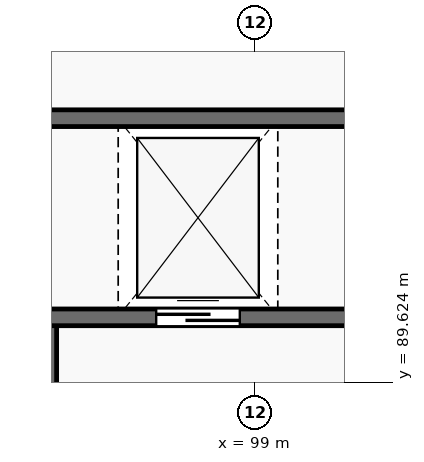
"""IFC4 building model, lengths in metres.
Left out: names, types, materials, properties, quantities, classifications, styles, units other than length and angle.
Written with IfcOpenShell. Run it as: python <this file> out.ifc"""

import sys

from ifc_helpers import new_model, si_unit, direction, frame, frame_2d, origin, place, context, subcontext, project, spatial, rectangle, extrude, element, fill, save


model = new_model("IFC4")
c1 = context("Model", 3, precision=1e-05, world=origin(), true_north=direction((0.0, 1.0)))
c2 = subcontext(c1, "Body", "Model", "MODEL_VIEW")
j1 = project(units=[si_unit("LENGTHUNIT", "METRE"), si_unit("PLANEANGLEUNIT", "RADIAN")], contexts=[c1])
p1 = place(None, origin())
s1 = spatial("IfcSite", under=j1, at=p1, CompositionType="ELEMENT")
p2 = place(p1, origin())
s2 = spatial("IfcBuilding", under=s1, at=p2, CompositionType="ELEMENT")
p3 = place(p2, frame((0.0, 0.0, 6.0)))
s3 = spatial("IfcBuildingStorey", under=s2, at=p3, CompositionType="ELEMENT", Elevation=6.0)
p4 = place(p3, frame((96.27, 86.4, 0.0), z_axis=(0.0, 0.0, 1.0), x_axis=(0.0, 1.0, 0.0)))
e1 = element("IfcWall", 1, at=p4, inside=s3, PredefinedType="SHEAR", context=c2, shape_type="SweptSolid", body=[
    extrude(rectangle(XDim=4.0, YDim=0.24, at=frame_2d((2.0, 0.0))), origin(), (0.0, 0.0, 1.0), 4.8),
])
p5 = place(p4, frame((1.3, 0.0, 0.0)))
e2 = element("IfcOpeningElement", 2, at=p5, cuts=e1, PredefinedType="OPENING", context=c2, shape_type="SweptSolid", body=[
    extrude(rectangle(XDim=1.4, YDim=2.2, at=frame_2d((0.7, 1.1))), frame((0.0, 0.135, 0.0), z_axis=(0.0, -1.0, 0.0), x_axis=(1.0, 0.0, 0.0)), (0.0, 0.0, 1.0), 0.27),
])
p6 = place(p3, frame((96.17, 90.48, 0.0), z_axis=(0.0, 0.0, 1.0), x_axis=(1.0, 0.0, 0.0)))
e3 = element("IfcWall", 3, at=p6, inside=s3, PredefinedType="SHEAR", context=c2, shape_type="SweptSolid", body=[
    extrude(rectangle(XDim=4.16, YDim=0.22, at=frame_2d((2.08, 0.0))), origin(), (0.0, 0.0, 1.0), 4.8),
])
p7 = place(p6, frame((1.53, 0.0, 0.0)))
e4 = element("IfcOpeningElement", 4, at=p7, cuts=e3, PredefinedType="OPENING", context=c2, shape_type="SweptSolid", body=[
    extrude(rectangle(XDim=1.1, YDim=2.15, at=frame_2d((0.55, 1.075))), frame((0.0, 0.125, 0.0), z_axis=(0.0, -1.0, 0.0), x_axis=(1.0, 0.0, 0.0)), (0.0, 0.0, 1.0), 0.25),
])
p8 = place(p3, frame((96.17, 93.1, 0.0), z_axis=(0.0, 0.0, 1.0), x_axis=(1.0, 0.0, 0.0)))
e5 = element("IfcWall", 5, at=p8, inside=s3, PredefinedType="SHEAR", context=c2, shape_type="SweptSolid", body=[
    extrude(rectangle(XDim=4.16, YDim=0.22, at=frame_2d((2.08, 0.0))), origin(), (0.0, 0.0, 1.0), 4.8),
])
p9 = place(p7, origin())
e6 = element("IfcDoor", 6, at=p9, inside=s3, OperationType="SLIDING_TO_LEFT", PredefinedType="DOOR", context=c2, shape_type="SweptSolid", body=[
    extrude(rectangle(XDim=1.1, YDim=2.15, at=frame_2d((0.55, 1.075))), frame((0.0, 0.025, 0.0), z_axis=(0.0, -1.0, 0.0), x_axis=(1.0, 0.0, 0.0)), (0.0, 0.0, 1.0), 0.05),
])
fill(e4, e6)
save(model, sys.argv[1])
